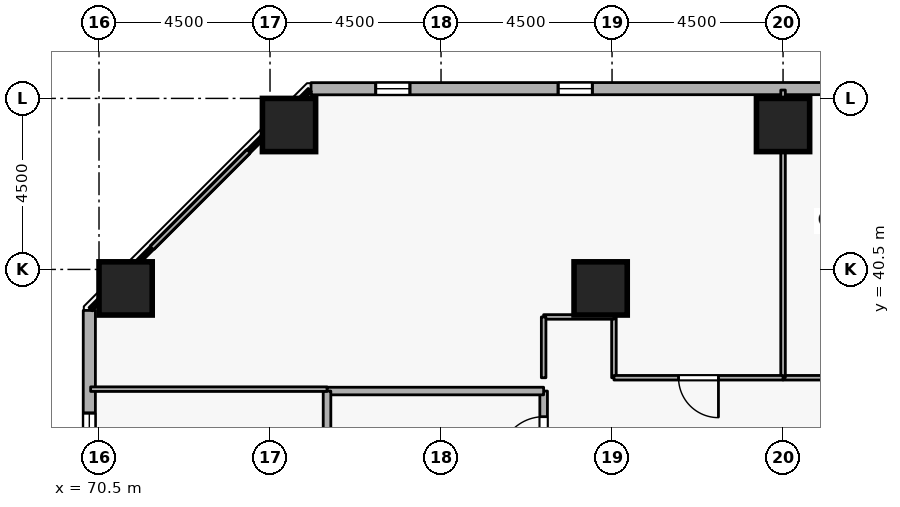
"""IFC4 building model, lengths in metres.
Left out: names, types, materials, properties, quantities, classifications, styles, units other than length and angle.
Written with IfcOpenShell. Run it as: python <this file> out.ifc"""

import sys

from ifc_helpers import new_model, si_unit, direction, frame, frame_2d, origin, origin_2d, place, context, subcontext, project, spatial, rectangle, extrude, element, fill, save


model = new_model("IFC4")
c1 = context("Model", 3, precision=1e-05, world=origin(), true_north=direction((0.0, 1.0)))
c2 = subcontext(c1, "Body", "Model", "MODEL_VIEW")
j1 = project(units=[si_unit("LENGTHUNIT", "METRE"), si_unit("PLANEANGLEUNIT", "RADIAN")], contexts=[c1])
p1 = place(None, origin())
s1 = spatial("IfcSite", under=j1, at=p1, CompositionType="ELEMENT")
p2 = place(p1, origin())
s2 = spatial("IfcBuilding", under=s1, at=p2, CompositionType="ELEMENT")
p3 = place(p2, frame((0.0, 0.0, 31.5)))
s3 = spatial("IfcBuildingStorey", under=s2, at=p3, CompositionType="ELEMENT", Elevation=31.5)
for number, where, z_axis, x_axis in (
    (1, (88.5, 44.3, 0.0), (0.0, 0.0, 1.0), (1.0, 0.0, 0.0)),
    (2, (75.5, 44.3, 0.0), (0.0, 0.0, 1.0), (1.0, 0.0, 0.0)),
    (3, (71.2, 40.0, 0.0), (0.0, 0.0, 1.0), (1.0, 0.0, 0.0)),
    (4, (83.7, 40.0, 0.0), (0.0, 0.0, 1.0), (1.0, 0.0, 0.0)),
):
    element("IfcColumn", number, at=place(p3, frame(where, z_axis=z_axis, x_axis=x_axis)), inside=s3, PredefinedType="COLUMN", context=c2, shape_type="SweptSolid", body=[
        extrude(rectangle(XDim=1.4, YDim=1.4, at=origin_2d()), origin(), (0.0, 0.0, 1.0), 3.6),
    ])
p4 = place(p3, frame((110.181, 45.265, 0.0), z_axis=(0.0, 0.0, 1.0), x_axis=(-0.999999952618, -0.000307837676, 0.0)))
e5 = element("IfcWall", 5, at=p4, inside=s3, PredefinedType="STANDARD", context=c2, shape_type="SweptSolid", body=[
    extrude(rectangle(XDim=34.103, YDim=0.32, at=frame_2d((17.051, 0.0))), origin(), (0.0, 0.0, 1.0), 2.7),
])
p5 = place(p4, frame((2.7, 0.0, 0.72)))
e6 = element("IfcOpeningElement", 6, at=p5, cuts=e5, PredefinedType="OPENING", context=c2, shape_type="SweptSolid", body=[
    extrude(rectangle(XDim=0.9, YDim=1.75, at=frame_2d((0.45, 0.875))), frame((0.0, 0.17, 0.0), z_axis=(0.0, -1.0, 0.0), x_axis=(1.0, 0.0, 0.0)), (0.0, 0.0, 1.0), 0.34),
])
p6 = place(p4, frame((12.3, 0.0, 0.72)))
e7 = element("IfcOpeningElement", 7, at=p6, cuts=e5, PredefinedType="OPENING", context=c2, shape_type="SweptSolid", body=[
    extrude(rectangle(XDim=0.9, YDim=1.75, at=frame_2d((0.45, 0.875))), frame((0.0, 0.17, 0.0), z_axis=(0.0, -1.0, 0.0), x_axis=(1.0, 0.0, 0.0)), (0.0, 0.0, 1.0), 0.34),
])
p7 = place(p4, frame((17.1, 0.0, 0.72)))
e8 = element("IfcOpeningElement", 8, at=p7, cuts=e5, PredefinedType="OPENING", context=c2, shape_type="SweptSolid", body=[
    extrude(rectangle(XDim=0.9, YDim=1.75, at=frame_2d((0.45, 0.875))), frame((0.0, 0.17, 0.0), z_axis=(0.0, -1.0, 0.0), x_axis=(1.0, 0.0, 0.0)), (0.0, 0.0, 1.0), 0.34),
])
p8 = place(p4, frame((26.7, 0.0, 0.72)))
e9 = element("IfcOpeningElement", 9, at=p8, cuts=e5, PredefinedType="OPENING", context=c2, shape_type="SweptSolid", body=[
    extrude(rectangle(XDim=0.9, YDim=1.75, at=frame_2d((0.45, 0.875))), frame((0.0, 0.17, 0.0), z_axis=(0.0, -1.0, 0.0), x_axis=(1.0, 0.0, 0.0)), (0.0, 0.0, 1.0), 0.34),
])
p9 = place(p4, frame((31.5, 0.0, 0.72)))
e10 = element("IfcOpeningElement", 10, at=p9, cuts=e5, PredefinedType="OPENING", context=c2, shape_type="SweptSolid", body=[
    extrude(rectangle(XDim=0.9, YDim=1.75, at=frame_2d((0.45, 0.875))), frame((0.0, 0.17, 0.0), z_axis=(0.0, -1.0, 0.0), x_axis=(1.0, 0.0, 0.0)), (0.0, 0.0, 1.0), 0.34),
])
p10 = place(p3, frame((70.246, 39.421, 0.0), z_axis=(0.0, 0.0, 1.0), x_axis=(-0.000307837676, -0.999999952618, 0.0)))
e11 = element("IfcWall", 11, at=p10, inside=s3, PredefinedType="STANDARD", context=c2, shape_type="SweptSolid", body=[
    extrude(rectangle(XDim=34.103, YDim=0.32, at=frame_2d((17.051, 0.0))), origin(), (0.0, 0.0, 1.0), 2.7),
])
p11 = place(p10, frame((2.7, 0.0, 0.72)))
e12 = element("IfcOpeningElement", 12, at=p11, cuts=e11, PredefinedType="OPENING", context=c2, shape_type="SweptSolid", body=[
    extrude(rectangle(XDim=0.9, YDim=1.75, at=frame_2d((0.45, 0.875))), frame((0.0, 0.17, 0.0), z_axis=(0.0, -1.0, 0.0), x_axis=(1.0, 0.0, 0.0)), (0.0, 0.0, 1.0), 0.34),
])
p12 = place(p10, frame((7.5, 0.0, 0.72)))
e13 = element("IfcOpeningElement", 13, at=p12, cuts=e11, PredefinedType="OPENING", context=c2, shape_type="SweptSolid", body=[
    extrude(rectangle(XDim=0.9, YDim=1.75, at=frame_2d((0.45, 0.875))), frame((0.0, 0.17, 0.0), z_axis=(0.0, -1.0, 0.0), x_axis=(1.0, 0.0, 0.0)), (0.0, 0.0, 1.0), 0.34),
])
p13 = place(p10, frame((17.1, 0.0, 0.72)))
e14 = element("IfcOpeningElement", 14, at=p13, cuts=e11, PredefinedType="OPENING", context=c2, shape_type="SweptSolid", body=[
    extrude(rectangle(XDim=0.9, YDim=1.75, at=frame_2d((0.45, 0.875))), frame((0.0, 0.17, 0.0), z_axis=(0.0, -1.0, 0.0), x_axis=(1.0, 0.0, 0.0)), (0.0, 0.0, 1.0), 0.34),
])
p14 = place(p10, frame((21.9, 0.0, 0.72)))
e15 = element("IfcOpeningElement", 15, at=p14, cuts=e11, PredefinedType="OPENING", context=c2, shape_type="SweptSolid", body=[
    extrude(rectangle(XDim=0.9, YDim=1.75, at=frame_2d((0.45, 0.875))), frame((0.0, 0.17, 0.0), z_axis=(0.0, -1.0, 0.0), x_axis=(1.0, 0.0, 0.0)), (0.0, 0.0, 1.0), 0.34),
])
p15 = place(p10, frame((31.5, 0.0, 0.72)))
e16 = element("IfcOpeningElement", 16, at=p15, cuts=e11, PredefinedType="OPENING", context=c2, shape_type="SweptSolid", body=[
    extrude(rectangle(XDim=0.9, YDim=1.75, at=frame_2d((0.45, 0.875))), frame((0.0, 0.17, 0.0), z_axis=(0.0, -1.0, 0.0), x_axis=(1.0, 0.0, 0.0)), (0.0, 0.0, 1.0), 0.34),
])
p16 = place(p3, frame((82.2, 34.8, 0.0), z_axis=(0.0, 0.0, 1.0), x_axis=(0.0, 1.0, 0.0)))
e17 = element("IfcWall", 17, at=p16, inside=s3, PredefinedType="STANDARD", context=c2, shape_type="SweptSolid", body=[
    extrude(rectangle(XDim=2.5, YDim=0.2, at=frame_2d((1.25, 0.0))), origin(), (0.0, 0.0, 1.0), 3.34),
])
p17 = place(p16, frame((0.675, 0.0, 0.0)))
e18 = element("IfcOpeningElement", 18, at=p17, cuts=e17, PredefinedType="OPENING", context=c2, shape_type="SweptSolid", body=[
    extrude(rectangle(XDim=1.15, YDim=2.1, at=frame_2d((0.575, 1.05))), frame((0.0, 0.11, 0.0), z_axis=(0.0, -1.0, 0.0), x_axis=(1.0, 0.0, 0.0)), (0.0, 0.0, 1.0), 0.22),
])
p18 = place(p3, frame((82.2, 37.3, 0.0), z_axis=(0.0, 0.0, 1.0), x_axis=(-1.0, 0.0, 0.0)))
e19 = element("IfcWall", 19, at=p18, inside=s3, PredefinedType="STANDARD", context=c2, shape_type="SweptSolid", body=[
    extrude(rectangle(XDim=5.7, YDim=0.2, at=frame_2d((2.85, 0.0))), origin(), (0.0, 0.0, 1.0), 3.34),
])
p19 = place(p3, frame((76.5, 37.3, 0.0), z_axis=(0.0, 0.0, 1.0), x_axis=(0.0, -1.0, 0.0)))
e20 = element("IfcWall", 20, at=p19, inside=s3, PredefinedType="STANDARD", context=c2, shape_type="SweptSolid", body=[
    extrude(rectangle(XDim=2.5, YDim=0.2, at=frame_2d((1.25, 0.0))), origin(), (0.0, 0.0, 1.0), 3.34),
])
p20 = place(p3, frame((92.95, 37.65, 0.0), z_axis=(0.0, 0.0, 1.0), x_axis=(-1.0, 0.0, 0.0)))
e21 = element("IfcWall", 21, at=p20, inside=s3, PredefinedType="PARTITIONING", context=c2, shape_type="SweptSolid", body=[
    extrude(rectangle(XDim=4.45, YDim=0.12, at=frame_2d((2.225, 0.0))), origin(), (0.0, 0.0, 1.0), 3.34),
])
p21 = place(p20, frame((1.7, 0.0, 0.0)))
e22 = element("IfcOpeningElement", 22, at=p21, cuts=e21, PredefinedType="OPENING", context=c2, shape_type="SweptSolid", body=[
    extrude(rectangle(XDim=1.05, YDim=2.1, at=frame_2d((0.525, 1.05))), frame((0.0, 0.07, 0.0), z_axis=(0.0, -1.0, 0.0), x_axis=(1.0, 0.0, 0.0)), (0.0, 0.0, 1.0), 0.14),
])
p22 = place(p3, frame((88.5, 37.65, 0.0), z_axis=(0.0, 0.0, 1.0), x_axis=(0.0, 1.0, 0.0)))
e23 = element("IfcWall", 23, at=p22, inside=s3, PredefinedType="PARTITIONING", context=c2, shape_type="SweptSolid", body=[
    extrude(rectangle(XDim=7.57, YDim=0.12, at=frame_2d((3.785, 0.0))), origin(), (0.0, 0.0, 1.0), 2.878),
])
p23 = place(p3, frame((84.05, 37.65, 0.0), z_axis=(0.0, 0.0, 1.0), x_axis=(0.0, 1.0, 0.0)))
e24 = element("IfcWall", 24, at=p23, inside=s3, PredefinedType="PARTITIONING", context=c2, shape_type="SweptSolid", body=[
    extrude(rectangle(XDim=1.6, YDim=0.12, at=frame_2d((0.8, 0.0))), origin(), (0.0, 0.0, 1.0), 3.34),
])
p24 = place(p3, frame((84.05, 39.25, 0.0), z_axis=(0.0, 0.0, 1.0), x_axis=(-1.0, 0.0, 0.0)))
e25 = element("IfcWall", 25, at=p24, inside=s3, PredefinedType="PARTITIONING", context=c2, shape_type="SweptSolid", body=[
    extrude(rectangle(XDim=1.85, YDim=0.12, at=frame_2d((0.925, 0.0))), origin(), (0.0, 0.0, 1.0), 3.34),
])
p25 = place(p3, frame((82.2, 39.25, 0.0), z_axis=(0.0, 0.0, 1.0), x_axis=(0.0, -1.0, 0.0)))
e26 = element("IfcWall", 26, at=p25, inside=s3, PredefinedType="PARTITIONING", context=c2, shape_type="SweptSolid", body=[
    extrude(rectangle(XDim=1.6, YDim=0.12, at=frame_2d((0.8, 0.0))), origin(), (0.0, 0.0, 1.0), 3.34),
])
p26 = place(p3, frame((76.5, 37.35, 0.0), z_axis=(0.0, 0.0, 1.0), x_axis=(-1.0, 0.0, 0.0)))
e27 = element("IfcWall", 27, at=p26, inside=s3, PredefinedType="PARTITIONING", context=c2, shape_type="SweptSolid", body=[
    extrude(rectangle(XDim=6.22, YDim=0.12, at=frame_2d((3.11, 0.0))), origin(), (0.0, 0.0, 1.0), 3.34),
])
p27 = place(p3, frame((70.28, 39.452, 0.0), z_axis=(0.0, 0.0, 1.0), x_axis=(0.707106781187, 0.707106781187, 0.0)))
e28 = element("IfcWall", 28, at=p27, inside=s3, PredefinedType="PARTITIONING", context=c2, shape_type="SweptSolid", body=[
    extrude(rectangle(XDim=8.156, YDim=0.12, at=frame_2d((4.078, 0.0))), origin(), (0.0, 0.0, 1.0), 3.34),
])
p28 = place(p3, frame((88.5, 37.65, 0.0), z_axis=(0.0, 0.0, 1.0), x_axis=(-1.0, 0.0, 0.0)))
e29 = element("IfcWall", 29, at=p28, inside=s3, PredefinedType="PARTITIONING", context=c2, shape_type="SweptSolid", body=[
    extrude(rectangle(XDim=4.45, YDim=0.12, at=frame_2d((2.225, 0.0))), origin(), (0.0, 0.0, 1.0), 3.34),
])
p29 = place(p28, frame((1.7, 0.0, 0.0)))
e30 = element("IfcOpeningElement", 30, at=p29, cuts=e29, PredefinedType="OPENING", context=c2, shape_type="SweptSolid", body=[
    extrude(rectangle(XDim=1.05, YDim=2.1, at=frame_2d((0.525, 1.05))), frame((0.0, 0.07, 0.0), z_axis=(0.0, -1.0, 0.0), x_axis=(1.0, 0.0, 0.0)), (0.0, 0.0, 1.0), 0.14),
])
p30 = place(p8, origin())
e31 = element("IfcWindow", 31, at=p30, inside=s3, PartitioningType="SINGLE_PANEL", PredefinedType="WINDOW", context=c2, shape_type="SweptSolid", body=[
    extrude(rectangle(XDim=0.9, YDim=1.75, at=frame_2d((0.45, 0.875))), frame((0.0, 0.03, 0.0), z_axis=(0.0, -1.0, 0.0), x_axis=(1.0, 0.0, 0.0)), (0.0, 0.0, 1.0), 0.06),
])
fill(e9, e31)
p31 = place(p9, origin())
e32 = element("IfcWindow", 32, at=p31, inside=s3, PartitioningType="SINGLE_PANEL", PredefinedType="WINDOW", context=c2, shape_type="SweptSolid", body=[
    extrude(rectangle(XDim=0.9, YDim=1.75, at=frame_2d((0.45, 0.875))), frame((0.0, 0.03, 0.0), z_axis=(0.0, -1.0, 0.0), x_axis=(1.0, 0.0, 0.0)), (0.0, 0.0, 1.0), 0.06),
])
fill(e10, e32)
p32 = place(p11, origin())
e33 = element("IfcWindow", 33, at=p32, inside=s3, PartitioningType="SINGLE_PANEL", PredefinedType="WINDOW", context=c2, shape_type="SweptSolid", body=[
    extrude(rectangle(XDim=0.9, YDim=1.75, at=frame_2d((0.45, 0.875))), frame((0.0, 0.03, 0.0), z_axis=(0.0, -1.0, 0.0), x_axis=(1.0, 0.0, 0.0)), (0.0, 0.0, 1.0), 0.06),
])
fill(e12, e33)
p33 = place(p17, origin())
e34 = element("IfcDoor", 34, at=p33, inside=s3, OperationType="SINGLE_SWING_LEFT", PredefinedType="DOOR", context=c2, shape_type="SweptSolid", body=[
    extrude(rectangle(XDim=1.15, YDim=2.1, at=frame_2d((0.575, 1.05))), frame((0.0, 0.025, 0.0), z_axis=(0.0, -1.0, 0.0), x_axis=(1.0, 0.0, 0.0)), (0.0, 0.0, 1.0), 0.05),
])
fill(e18, e34)
p34 = place(p29, origin())
e35 = element("IfcDoor", 35, at=p34, inside=s3, OperationType="SINGLE_SWING_LEFT", PredefinedType="DOOR", context=c2, shape_type="SweptSolid", body=[
    extrude(rectangle(XDim=1.05, YDim=2.1, at=frame_2d((0.525, 1.05))), frame((0.0, 0.025, 0.0), z_axis=(0.0, -1.0, 0.0), x_axis=(1.0, 0.0, 0.0)), (0.0, 0.0, 1.0), 0.05),
])
fill(e30, e35)
save(model, sys.argv[1])
